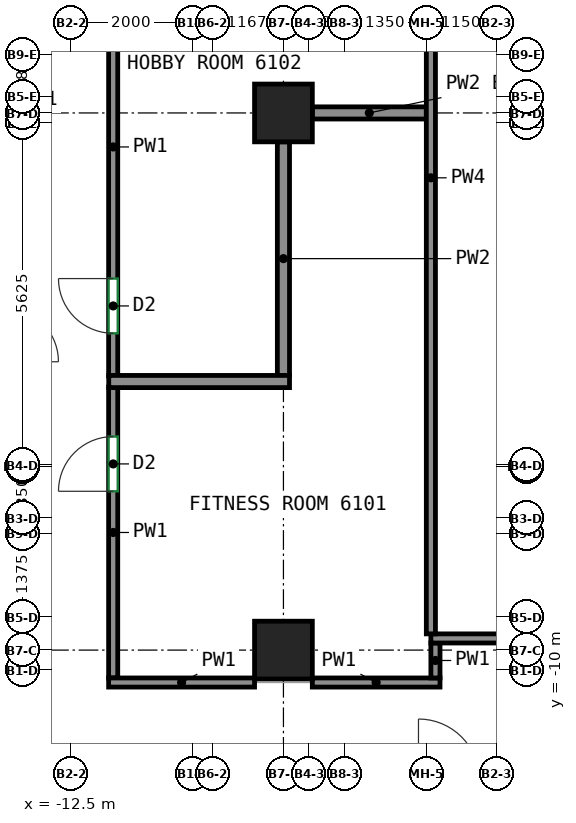
"""IFC4 building model, lengths in metres.
Left out: names, types, materials, properties, quantities, classifications, styles, units other than length and angle.
Written with IfcOpenShell. Run it as: python <this file> out.ifc"""

import sys

from ifc_helpers import new_model, si_unit, direction, frame, frame_2d, origin, origin_2d, place, context, subcontext, project, spatial, rectangle, extrude, source, transform, mapped, element, fill, save


model = new_model("IFC4")
c1 = context("Model", 3, precision=1e-05, world=origin(), true_north=direction((0.0, 1.0)))
c2 = subcontext(c1, "Body", "Model", "MODEL_VIEW")
j1 = project(units=[si_unit("LENGTHUNIT", "METRE"), si_unit("PLANEANGLEUNIT", "RADIAN")], contexts=[c1])
p1 = place(None, origin())
s1 = spatial("IfcSite", under=j1, at=p1, CompositionType="ELEMENT")
p2 = place(p1, origin())
s2 = spatial("IfcBuilding", under=s1, at=p2, CompositionType="ELEMENT")
p3 = place(p2, frame((0.0, 0.0, 252.6)))
s3 = spatial("IfcBuildingStorey", under=s2, at=p3, CompositionType="ELEMENT", Elevation=252.6)
m1 = source(origin(), c2, "Body", "SweptSolid", [
    extrude(rectangle(XDim=0.95, YDim=0.95, at=origin_2d()), origin(), (0.0, 0.0, 1.0), 3.12),
])
for number, where, z_axis, x_axis in (
    (1, (-9.0, -9.667, 0.0), (0.0, 0.0, 1.0), (1.0, 0.0, 0.0)),
    (2, (-9.0, -0.833, 0.0), (0.0, 0.0, 1.0), (1.0, 0.0, 0.0)),
):
    element("IfcColumn", number, at=place(p3, frame(where, z_axis=z_axis, x_axis=x_axis)), inside=s3, PredefinedType="COLUMN", context=c2, shape_type="MappedRepresentation", body=[
        mapped(m1, transform((0.0, 0.0, 0.0))),
    ])
p4 = place(p3, frame((-11.8, -5.16, 0.0), z_axis=(0.0, 0.0, 1.0), x_axis=(0.0, 1.0, 0.0)))
e3 = element("IfcWall", 3, at=p4, inside=s3, PredefinedType="PARTITIONING", context=c2, shape_type="SweptSolid", body=[
    extrude(rectangle(XDim=7.535, YDim=0.15, at=frame_2d((3.768, 0.0))), origin(), (0.0, 0.0, 1.0), 3.12),
])
p5 = place(p4, frame((0.703, 0.0, 0.0)))
e4 = element("IfcOpeningElement", 4, at=p5, cuts=e3, PredefinedType="OPENING", context=c2, shape_type="SweptSolid", body=[
    extrude(rectangle(XDim=0.9, YDim=2.1, at=frame_2d((0.45, 1.05))), frame((0.0, 0.085, 0.0), z_axis=(0.0, -1.0, 0.0), x_axis=(1.0, 0.0, 0.0)), (0.0, 0.0, 1.0), 0.17),
])
p6 = place(p3, frame((-11.8, -10.125, 0.0), z_axis=(0.0, 0.0, 1.0), x_axis=(0.0, 1.0, 0.0)))
e5 = element("IfcWall", 5, at=p6, inside=s3, PredefinedType="PARTITIONING", context=c2, shape_type="SweptSolid", body=[
    extrude(rectangle(XDim=4.785, YDim=0.15, at=frame_2d((2.393, 0.0))), origin(), (0.0, 0.0, 1.0), 3.12),
])
p7 = place(p6, frame((3.07, 0.0, 0.0)))
e6 = element("IfcOpeningElement", 6, at=p7, cuts=e5, PredefinedType="OPENING", context=c2, shape_type="SweptSolid", body=[
    extrude(rectangle(XDim=0.9, YDim=2.1, at=frame_2d((0.45, 1.05))), frame((0.0, 0.085, 0.0), z_axis=(0.0, -1.0, 0.0), x_axis=(1.0, 0.0, 0.0)), (0.0, 0.0, 1.0), 0.17),
])
p8 = place(p3, frame((-8.525, -10.2, 0.0), z_axis=(0.0, 0.0, 1.0), x_axis=(1.0, 0.0, 0.0)))
e7 = element("IfcWall", 7, at=p8, inside=s3, PredefinedType="PARTITIONING", context=c2, shape_type="SweptSolid", body=[
    extrude(rectangle(XDim=2.1, YDim=0.15, at=frame_2d((1.05, 0.0))), origin(), (0.0, 0.0, 1.0), 3.12),
])
p9 = place(p3, frame((-11.875, -10.2, 0.0), z_axis=(0.0, 0.0, 1.0), x_axis=(1.0, 0.0, 0.0)))
e8 = element("IfcWall", 8, at=p9, inside=s3, PredefinedType="PARTITIONING", context=c2, shape_type="SweptSolid", body=[
    extrude(rectangle(XDim=2.4, YDim=0.15, at=frame_2d((1.2, 0.0))), origin(), (0.0, 0.0, 1.0), 3.12),
])
p10 = place(p3, frame((-6.5, -9.55, 0.0), z_axis=(0.0, 0.0, 1.0), x_axis=(0.0, -1.0, 0.0)))
e9 = element("IfcWall", 9, at=p10, inside=s3, PredefinedType="PARTITIONING", context=c2, shape_type="SweptSolid", body=[
    extrude(rectangle(XDim=0.575, YDim=0.15, at=frame_2d((0.288, 0.0))), origin(), (0.0, 0.0, 1.0), 3.12),
])
p11 = place(p3, frame((-8.525, -0.833, 0.0), z_axis=(0.0, 0.0, 1.0), x_axis=(1.0, 0.0, 0.0)))
e10 = element("IfcWall", 10, at=p11, inside=s3, PredefinedType="PARTITIONING", context=c2, shape_type="SweptSolid", body=[
    extrude(rectangle(XDim=1.875, YDim=0.2, at=frame_2d((0.938, 0.0))), origin(), (0.0, 0.0, 1.0), 2.57),
])
p12 = place(p3, frame((-9.0, -5.15, 0.0), z_axis=(0.0, 0.0, 1.0), x_axis=(0.0, 1.0, 0.0)))
e11 = element("IfcWall", 11, at=p12, inside=s3, PredefinedType="PARTITIONING", context=c2, shape_type="SweptSolid", body=[
    extrude(rectangle(XDim=3.842, YDim=0.2, at=frame_2d((1.921, 0.0))), origin(), (0.0, 0.0, 1.0), 2.57),
])
p13 = place(p3, frame((-11.873, -5.25, 0.0), z_axis=(0.0, 0.0, 1.0), x_axis=(1.0, 0.0, 0.0)))
e12 = element("IfcWall", 12, at=p13, inside=s3, PredefinedType="PARTITIONING", context=c2, shape_type="SweptSolid", body=[
    extrude(rectangle(XDim=2.973, YDim=0.2, at=frame_2d((1.487, 0.0))), origin(), (0.0, 0.0, 1.0), 3.12),
])
p14 = place(p3, frame((8.5, -9.475, 0.0), z_axis=(0.0, 0.0, 1.0), x_axis=(-1.0, 0.0, 0.0)))
e13 = element("IfcWall", 13, at=p14, inside=s3, PredefinedType="PARTITIONING", context=c2, shape_type="SweptSolid", body=[
    extrude(rectangle(XDim=15.075, YDim=0.15, at=frame_2d((7.538, 0.0))), origin(), (0.0, 0.0, 1.0), 2.57),
])
p15 = place(p3, frame((-6.575, -9.4, 0.0), z_axis=(0.0, 0.0, 1.0), x_axis=(0.0, 1.0, 0.0)))
e14 = element("IfcWall", 14, at=p15, inside=s3, PredefinedType="PARTITIONING", context=c2, shape_type="SweptSolid", body=[
    extrude(rectangle(XDim=15.0, YDim=0.15, at=frame_2d((7.5, 0.0))), origin(), (0.0, 0.0, 1.0), 3.12),
])
p16 = place(p7, origin())
e15 = element("IfcDoor", 15, at=p16, inside=s3, OperationType="SINGLE_SWING_LEFT", PredefinedType="DOOR", context=c2, shape_type="SweptSolid", body=[
    extrude(rectangle(XDim=0.9, YDim=2.1, at=frame_2d((0.45, 1.05))), frame((0.0, 0.025, 0.0), z_axis=(0.0, -1.0, 0.0), x_axis=(1.0, 0.0, 0.0)), (0.0, 0.0, 1.0), 0.05),
])
fill(e6, e15)
p17 = place(p5, origin())
e16 = element("IfcDoor", 16, at=p17, inside=s3, OperationType="SINGLE_SWING_RIGHT", PredefinedType="DOOR", context=c2, shape_type="SweptSolid", body=[
    extrude(rectangle(XDim=0.9, YDim=2.1, at=frame_2d((0.45, 1.05))), frame((0.0, 0.025, 0.0), z_axis=(0.0, -1.0, 0.0), x_axis=(1.0, 0.0, 0.0)), (0.0, 0.0, 1.0), 0.05),
])
fill(e4, e16)
save(model, sys.argv[1])
